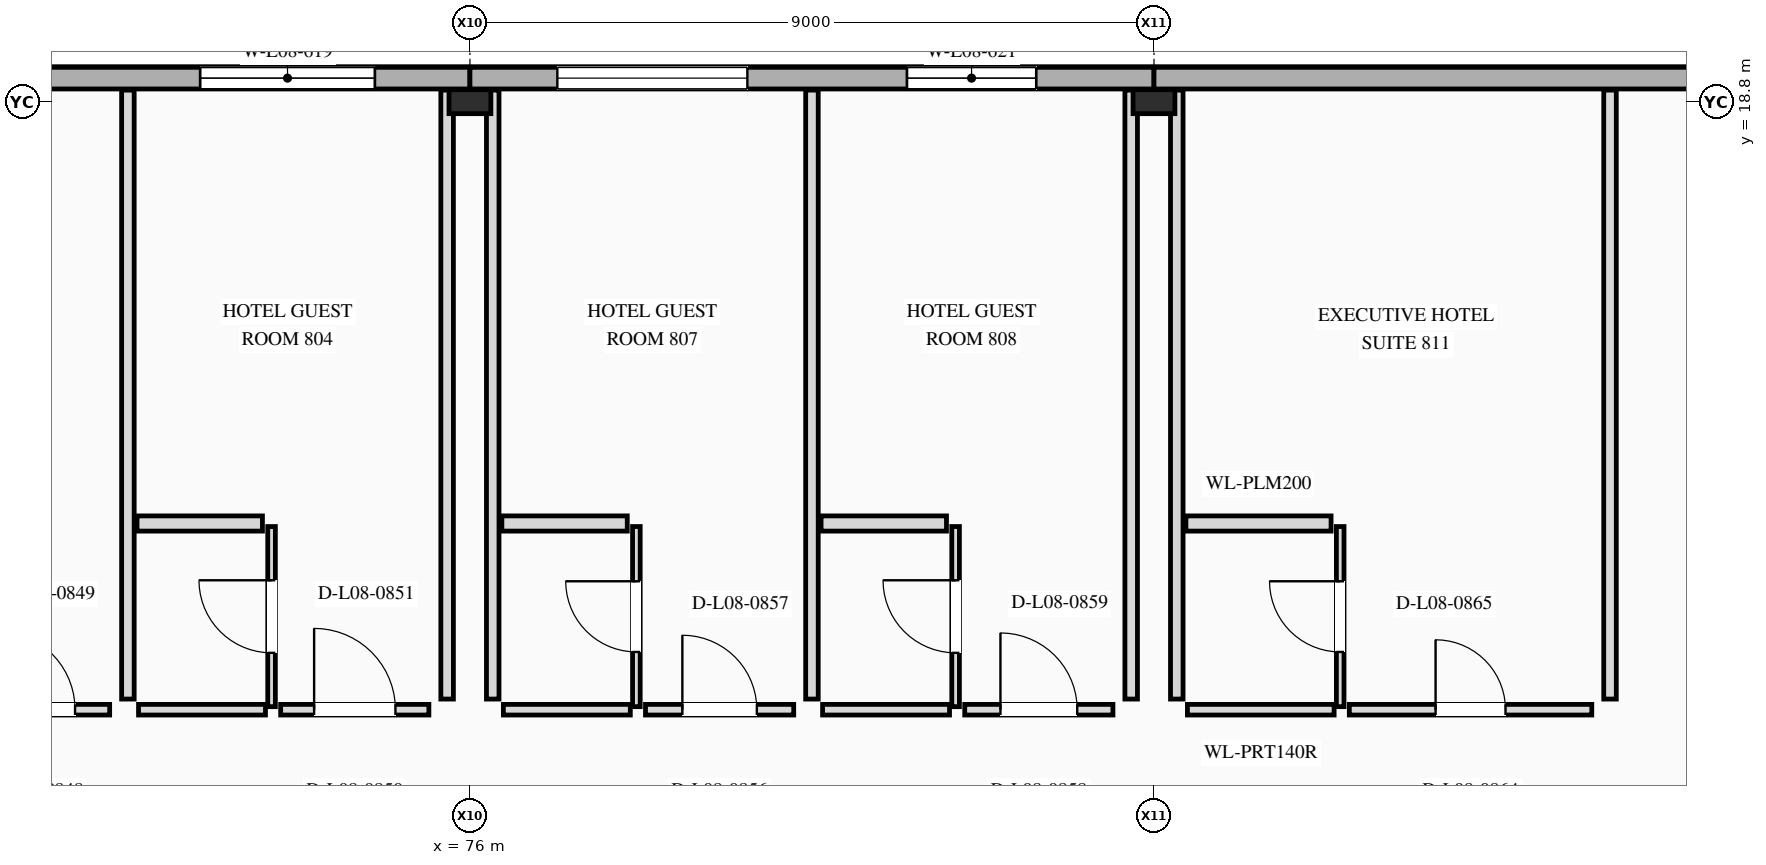
"""IFC4 building model, lengths in metres.
Left out: names, types, materials, properties, quantities, classifications, styles, units other than length and angle.
Written with IfcOpenShell. Run it as: python <this file> out.ifc"""

import sys

from ifc_helpers import new_model, si_unit, direction, frame, frame_2d, origin, origin_2d, place, context, subcontext, project, spatial, rectangle, i_section, extrude, element, fill, save


model = new_model("IFC4")
c1 = context("Model", 3, precision=1e-05, world=origin(), true_north=direction((0.0, 1.0)))
c2 = subcontext(c1, "Body", "Model", "MODEL_VIEW")
j1 = project(units=[si_unit("LENGTHUNIT", "METRE"), si_unit("PLANEANGLEUNIT", "RADIAN")], contexts=[c1])
p1 = place(None, origin())
s1 = spatial("IfcSite", under=j1, at=p1, CompositionType="ELEMENT")
p2 = place(p1, origin())
s2 = spatial("IfcBuilding", under=s1, at=p2, CompositionType="ELEMENT")
p3 = place(p2, frame((0.0, 0.0, 34.1)))
s3 = spatial("IfcBuildingStorey", under=s2, at=p3, CompositionType="ELEMENT", Elevation=34.1)
for number, where, z_axis, x_axis in (
    (1, (76.0, 18.8, 0.0), (0.0, 0.0, 1.0), (0.0, 1.0, 0.0)),
    (2, (85.0, 18.8, 0.0), (0.0, 0.0, 1.0), (0.0, 1.0, 0.0)),
):
    element("IfcColumn", number, at=place(p3, frame(where, z_axis=z_axis, x_axis=x_axis)), inside=s3, PredefinedType="COLUMN", context=c2, shape_type="SweptSolid", body=[
        extrude(i_section(OverallWidth=0.315, OverallDepth=0.551, WebThickness=0.015, FlangeThickness=0.024, at=origin_2d()), origin(), (0.0, 0.0, 1.0), 3.5),
    ])
p4 = place(p3, frame((76.0, 19.11, 0.0), z_axis=(0.0, 0.0, 1.0), x_axis=(-1.0, 0.0, 0.0)))
e3 = element("IfcWall", 3, at=p4, inside=s3, PredefinedType="STANDARD", context=c2, shape_type="SweptSolid", body=[
    extrude(rectangle(XDim=9.31, YDim=0.285, at=frame_2d((4.655, 0.0))), origin(), (0.0, 0.0, 1.0), 3.5),
])
p5 = place(p4, frame((5.6, 0.0, 0.85)))
e4 = element("IfcOpeningElement", 4, at=p5, cuts=e3, PredefinedType="OPENING", context=c2, shape_type="SweptSolid", body=[
    extrude(rectangle(XDim=2.0, YDim=1.65, at=frame_2d((1.0, 0.825))), frame((0.0, 0.152, 0.0), z_axis=(0.0, -1.0, 0.0), x_axis=(1.0, 0.0, 0.0)), (0.0, 0.0, 1.0), 0.305),
])
p6 = place(p4, frame((1.25, 0.0, 0.85)))
e5 = element("IfcOpeningElement", 5, at=p6, cuts=e3, PredefinedType="OPENING", context=c2, shape_type="SweptSolid", body=[
    extrude(rectangle(XDim=2.3, YDim=1.7, at=frame_2d((1.15, 0.85))), frame((0.0, 0.152, 0.0), z_axis=(0.0, -1.0, 0.0), x_axis=(1.0, 0.0, 0.0)), (0.0, 0.0, 1.0), 0.305),
])
p7 = place(p3, frame((85.0, 19.11, 0.0), z_axis=(0.0, 0.0, 1.0), x_axis=(-1.0, 0.0, 0.0)))
e6 = element("IfcWall", 6, at=p7, inside=s3, PredefinedType="STANDARD", context=c2, shape_type="SweptSolid", body=[
    extrude(rectangle(XDim=9.0, YDim=0.285, at=frame_2d((4.5, 0.0))), origin(), (0.0, 0.0, 1.0), 3.5),
])
p8 = place(p7, frame((5.35, 0.0, 0.85)))
e7 = element("IfcOpeningElement", 7, at=p8, cuts=e6, PredefinedType="OPENING", context=c2, shape_type="SweptSolid", body=[
    extrude(rectangle(XDim=2.5, YDim=1.75, at=frame_2d((1.25, 0.875))), frame((0.0, 0.152, 0.0), z_axis=(0.0, -1.0, 0.0), x_axis=(1.0, 0.0, 0.0)), (0.0, 0.0, 1.0), 0.305),
])
p9 = place(p7, frame((1.55, 0.0, 0.85)))
e8 = element("IfcOpeningElement", 8, at=p9, cuts=e6, PredefinedType="OPENING", context=c2, shape_type="SweptSolid", body=[
    extrude(rectangle(XDim=1.7, YDim=1.6, at=frame_2d((0.85, 0.8))), frame((0.0, 0.152, 0.0), z_axis=(0.0, -1.0, 0.0), x_axis=(1.0, 0.0, 0.0)), (0.0, 0.0, 1.0), 0.305),
])
p10 = place(p3, frame((94.0, 19.11, 0.0), z_axis=(0.0, 0.0, 1.0), x_axis=(-1.0, 0.0, 0.0)))
e9 = element("IfcWall", 9, at=p10, inside=s3, PredefinedType="STANDARD", context=c2, shape_type="SweptSolid", body=[
    extrude(rectangle(XDim=9.0, YDim=0.285, at=frame_2d((4.5, 0.0))), origin(), (0.0, 0.0, 1.0), 3.5),
])
p11 = place(p3, frame((69.31, 10.8, 0.0), z_axis=(0.0, 0.0, 1.0), x_axis=(1.0, 0.0, 0.0)))
e10 = element("IfcWall", 10, at=p11, inside=s3, PredefinedType="PARTITIONING", context=c2, shape_type="SweptSolid", body=[
    extrude(rectangle(XDim=1.95, YDim=0.14, at=frame_2d((0.975, 0.0))), origin(), (0.0, 0.0, 1.0), 3.19),
])
p12 = place(p11, frame((0.455, 0.0, 0.0)))
e11 = element("IfcOpeningElement", 11, at=p12, cuts=e10, PredefinedType="OPENING", context=c2, shape_type="SweptSolid", body=[
    extrude(rectangle(XDim=1.04, YDim=2.4, at=frame_2d((0.52, 1.2))), frame((0.0, 0.08, 0.0), z_axis=(0.0, -1.0, 0.0), x_axis=(1.0, 0.0, 0.0)), (0.0, 0.0, 1.0), 0.16),
])
p13 = place(p3, frame((71.5, 10.94, 0.0), z_axis=(0.0, 0.0, 1.0), x_axis=(0.0, 1.0, 0.0)))
e12 = element("IfcWall", 12, at=p13, inside=s3, PredefinedType="PARTITIONING", context=c2, shape_type="SweptSolid", body=[
    extrude(rectangle(XDim=8.012, YDim=0.165, at=frame_2d((4.006, 0.0))), origin(), (0.0, 0.0, 1.0), 2.603),
])
p14 = place(p3, frame((71.64, 10.8, 0.0), z_axis=(0.0, 0.0, 1.0), x_axis=(1.0, 0.0, 0.0)))
e13 = element("IfcWall", 13, at=p14, inside=s3, PredefinedType="PARTITIONING", context=c2, shape_type="SweptSolid", body=[
    extrude(rectangle(XDim=1.67, YDim=0.14, at=frame_2d((0.835, 0.0))), origin(), (0.0, 0.0, 1.0), 3.19),
])
p15 = place(p3, frame((73.51, 10.8, 0.0), z_axis=(0.0, 0.0, 1.0), x_axis=(1.0, 0.0, 0.0)))
e14 = element("IfcWall", 14, at=p15, inside=s3, PredefinedType="PARTITIONING", context=c2, shape_type="SweptSolid", body=[
    extrude(rectangle(XDim=1.95, YDim=0.14, at=frame_2d((0.975, 0.0))), origin(), (0.0, 0.0, 1.0), 3.19),
])
p16 = place(p15, frame((0.44, 0.0, 0.0)))
e15 = element("IfcOpeningElement", 15, at=p16, cuts=e14, PredefinedType="OPENING", context=c2, shape_type="SweptSolid", body=[
    extrude(rectangle(XDim=1.07, YDim=2.4, at=frame_2d((0.535, 1.2))), frame((0.0, 0.08, 0.0), z_axis=(0.0, -1.0, 0.0), x_axis=(1.0, 0.0, 0.0)), (0.0, 0.0, 1.0), 0.16),
])
p17 = place(p3, frame((75.7, 10.94, 0.0), z_axis=(0.0, 0.0, 1.0), x_axis=(0.0, 1.0, 0.0)))
e16 = element("IfcWall", 16, at=p17, inside=s3, PredefinedType="PARTITIONING", context=c2, shape_type="SweptSolid", body=[
    extrude(rectangle(XDim=8.012, YDim=0.165, at=frame_2d((4.006, 0.0))), origin(), (0.0, 0.0, 1.0), 2.519),
])
p18 = place(p3, frame((73.39, 10.84, 0.0), z_axis=(0.0, 0.0, 1.0), x_axis=(0.0, 1.0, 0.0)))
e17 = element("IfcWall", 17, at=p18, inside=s3, PredefinedType="PARTITIONING", context=c2, shape_type="SweptSolid", body=[
    extrude(rectangle(XDim=2.37, YDim=0.1, at=frame_2d((1.185, 0.0))), origin(), (0.0, 0.0, 1.0), 2.798),
])
p19 = place(p18, frame((0.708, 0.0, 0.0)))
e18 = element("IfcOpeningElement", 18, at=p19, cuts=e17, PredefinedType="OPENING", context=c2, shape_type="SweptSolid", body=[
    extrude(rectangle(XDim=0.955, YDim=2.14, at=frame_2d((0.478, 1.07))), frame((0.0, 0.06, 0.0), z_axis=(0.0, -1.0, 0.0), x_axis=(1.0, 0.0, 0.0)), (0.0, 0.0, 1.0), 0.12),
])
p20 = place(p3, frame((71.62, 13.25, 0.0), z_axis=(0.0, 0.0, 1.0), x_axis=(1.0, 0.0, 0.0)))
e19 = element("IfcWall", 19, at=p20, inside=s3, PredefinedType="PLUMBINGWALL", context=c2, shape_type="SweptSolid", body=[
    extrude(rectangle(XDim=1.65, YDim=0.2, at=frame_2d((0.825, 0.0))), origin(), (0.0, 0.0, 1.0), 3.19),
])
p21 = place(p3, frame((76.44, 10.8, 0.0), z_axis=(0.0, 0.0, 1.0), x_axis=(1.0, 0.0, 0.0)))
e20 = element("IfcWall", 20, at=p21, inside=s3, PredefinedType="PARTITIONING", context=c2, shape_type="SweptSolid", body=[
    extrude(rectangle(XDim=1.67, YDim=0.14, at=frame_2d((0.835, 0.0))), origin(), (0.0, 0.0, 1.0), 3.19),
])
p22 = place(p3, frame((78.31, 10.8, 0.0), z_axis=(0.0, 0.0, 1.0), x_axis=(1.0, 0.0, 0.0)))
e21 = element("IfcWall", 21, at=p22, inside=s3, PredefinedType="PARTITIONING", context=c2, shape_type="SweptSolid", body=[
    extrude(rectangle(XDim=1.95, YDim=0.14, at=frame_2d((0.975, 0.0))), origin(), (0.0, 0.0, 1.0), 3.19),
])
p23 = place(p22, frame((0.485, 0.0, 0.0)))
e22 = element("IfcOpeningElement", 22, at=p23, cuts=e21, PredefinedType="OPENING", context=c2, shape_type="SweptSolid", body=[
    extrude(rectangle(XDim=0.98, YDim=2.2, at=frame_2d((0.49, 1.1))), frame((0.0, 0.08, 0.0), z_axis=(0.0, -1.0, 0.0), x_axis=(1.0, 0.0, 0.0)), (0.0, 0.0, 1.0), 0.16),
])
p24 = place(p3, frame((76.3, 10.94, 0.0), z_axis=(0.0, 0.0, 1.0), x_axis=(0.0, 1.0, 0.0)))
e23 = element("IfcWall", 23, at=p24, inside=s3, PredefinedType="PARTITIONING", context=c2, shape_type="SweptSolid", body=[
    extrude(rectangle(XDim=8.012, YDim=0.165, at=frame_2d((4.006, 0.0))), origin(), (0.0, 0.0, 1.0), 2.519),
])
p25 = place(p3, frame((80.5, 10.94, 0.0), z_axis=(0.0, 0.0, 1.0), x_axis=(0.0, 1.0, 0.0)))
e24 = element("IfcWall", 24, at=p25, inside=s3, PredefinedType="PARTITIONING", context=c2, shape_type="SweptSolid", body=[
    extrude(rectangle(XDim=8.012, YDim=0.165, at=frame_2d((4.006, 0.0))), origin(), (0.0, 0.0, 1.0), 2.603),
])
p26 = place(p3, frame((78.19, 10.84, 0.0), z_axis=(0.0, 0.0, 1.0), x_axis=(0.0, 1.0, 0.0)))
e25 = element("IfcWall", 25, at=p26, inside=s3, PredefinedType="PARTITIONING", context=c2, shape_type="SweptSolid", body=[
    extrude(rectangle(XDim=2.37, YDim=0.1, at=frame_2d((1.185, 0.0))), origin(), (0.0, 0.0, 1.0), 2.798),
])
p27 = place(p26, frame((0.72, 0.0, 0.0)))
e26 = element("IfcOpeningElement", 26, at=p27, cuts=e25, PredefinedType="OPENING", context=c2, shape_type="SweptSolid", body=[
    extrude(rectangle(XDim=0.93, YDim=2.22, at=frame_2d((0.465, 1.11))), frame((0.0, 0.06, 0.0), z_axis=(0.0, -1.0, 0.0), x_axis=(1.0, 0.0, 0.0)), (0.0, 0.0, 1.0), 0.12),
])
p28 = place(p3, frame((76.42, 13.25, 0.0), z_axis=(0.0, 0.0, 1.0), x_axis=(1.0, 0.0, 0.0)))
e27 = element("IfcWall", 27, at=p28, inside=s3, PredefinedType="PLUMBINGWALL", context=c2, shape_type="SweptSolid", body=[
    extrude(rectangle(XDim=1.65, YDim=0.2, at=frame_2d((0.825, 0.0))), origin(), (0.0, 0.0, 1.0), 3.19),
])
p29 = place(p3, frame((80.64, 10.8, 0.0), z_axis=(0.0, 0.0, 1.0), x_axis=(1.0, 0.0, 0.0)))
e28 = element("IfcWall", 28, at=p29, inside=s3, PredefinedType="PARTITIONING", context=c2, shape_type="SweptSolid", body=[
    extrude(rectangle(XDim=1.67, YDim=0.14, at=frame_2d((0.835, 0.0))), origin(), (0.0, 0.0, 1.0), 3.19),
])
p30 = place(p3, frame((82.51, 10.8, 0.0), z_axis=(0.0, 0.0, 1.0), x_axis=(1.0, 0.0, 0.0)))
e29 = element("IfcWall", 29, at=p30, inside=s3, PredefinedType="PARTITIONING", context=c2, shape_type="SweptSolid", body=[
    extrude(rectangle(XDim=1.95, YDim=0.14, at=frame_2d((0.975, 0.0))), origin(), (0.0, 0.0, 1.0), 3.19),
])
p31 = place(p30, frame((0.47, 0.0, 0.0)))
e30 = element("IfcOpeningElement", 30, at=p31, cuts=e29, PredefinedType="OPENING", context=c2, shape_type="SweptSolid", body=[
    extrude(rectangle(XDim=1.01, YDim=2.2, at=frame_2d((0.505, 1.1))), frame((0.0, 0.08, 0.0), z_axis=(0.0, -1.0, 0.0), x_axis=(1.0, 0.0, 0.0)), (0.0, 0.0, 1.0), 0.16),
])
p32 = place(p3, frame((84.7, 10.94, 0.0), z_axis=(0.0, 0.0, 1.0), x_axis=(0.0, 1.0, 0.0)))
e31 = element("IfcWall", 31, at=p32, inside=s3, PredefinedType="PARTITIONING", context=c2, shape_type="SweptSolid", body=[
    extrude(rectangle(XDim=8.012, YDim=0.165, at=frame_2d((4.006, 0.0))), origin(), (0.0, 0.0, 1.0), 2.519),
])
p33 = place(p3, frame((82.39, 10.84, 0.0), z_axis=(0.0, 0.0, 1.0), x_axis=(0.0, 1.0, 0.0)))
e32 = element("IfcWall", 32, at=p33, inside=s3, PredefinedType="PARTITIONING", context=c2, shape_type="SweptSolid", body=[
    extrude(rectangle(XDim=2.37, YDim=0.1, at=frame_2d((1.185, 0.0))), origin(), (0.0, 0.0, 1.0), 2.798),
])
p34 = place(p33, frame((0.708, 0.0, 0.0)))
e33 = element("IfcOpeningElement", 33, at=p34, cuts=e32, PredefinedType="OPENING", context=c2, shape_type="SweptSolid", body=[
    extrude(rectangle(XDim=0.955, YDim=2.22, at=frame_2d((0.478, 1.11))), frame((0.0, 0.06, 0.0), z_axis=(0.0, -1.0, 0.0), x_axis=(1.0, 0.0, 0.0)), (0.0, 0.0, 1.0), 0.12),
])
p35 = place(p3, frame((80.62, 13.25, 0.0), z_axis=(0.0, 0.0, 1.0), x_axis=(1.0, 0.0, 0.0)))
e34 = element("IfcWall", 34, at=p35, inside=s3, PredefinedType="PLUMBINGWALL", context=c2, shape_type="SweptSolid", body=[
    extrude(rectangle(XDim=1.65, YDim=0.2, at=frame_2d((0.825, 0.0))), origin(), (0.0, 0.0, 1.0), 3.19),
])
p36 = place(p3, frame((85.44, 10.8, 0.0), z_axis=(0.0, 0.0, 1.0), x_axis=(1.0, 0.0, 0.0)))
e35 = element("IfcWall", 35, at=p36, inside=s3, PredefinedType="PARTITIONING", context=c2, shape_type="SweptSolid", body=[
    extrude(rectangle(XDim=1.93, YDim=0.14, at=frame_2d((0.965, 0.0))), origin(), (0.0, 0.0, 1.0), 3.19),
])
p37 = place(p3, frame((87.57, 10.8, 0.0), z_axis=(0.0, 0.0, 1.0), x_axis=(1.0, 0.0, 0.0)))
e36 = element("IfcWall", 36, at=p37, inside=s3, PredefinedType="PARTITIONING", context=c2, shape_type="SweptSolid", body=[
    extrude(rectangle(XDim=3.19, YDim=0.14, at=frame_2d((1.595, 0.0))), origin(), (0.0, 0.0, 1.0), 3.19),
])
p38 = place(p37, frame((1.135, 0.0, 0.0)))
e37 = element("IfcOpeningElement", 37, at=p38, cuts=e36, PredefinedType="OPENING", context=c2, shape_type="SweptSolid", body=[
    extrude(rectangle(XDim=0.92, YDim=2.3, at=frame_2d((0.46, 1.15))), frame((0.0, 0.08, 0.0), z_axis=(0.0, -1.0, 0.0), x_axis=(1.0, 0.0, 0.0)), (0.0, 0.0, 1.0), 0.16),
])
p39 = place(p3, frame((85.3, 10.94, 0.0), z_axis=(0.0, 0.0, 1.0), x_axis=(0.0, 1.0, 0.0)))
e38 = element("IfcWall", 38, at=p39, inside=s3, PredefinedType="PARTITIONING", context=c2, shape_type="SweptSolid", body=[
    extrude(rectangle(XDim=8.012, YDim=0.165, at=frame_2d((4.006, 0.0))), origin(), (0.0, 0.0, 1.0), 2.519),
])
p40 = place(p3, frame((91.0, 10.94, 0.0), z_axis=(0.0, 0.0, 1.0), x_axis=(0.0, 1.0, 0.0)))
e39 = element("IfcWall", 39, at=p40, inside=s3, PredefinedType="PARTITIONING", context=c2, shape_type="SweptSolid", body=[
    extrude(rectangle(XDim=8.012, YDim=0.165, at=frame_2d((4.006, 0.0))), origin(), (0.0, 0.0, 1.0), 3.19),
])
p41 = place(p3, frame((87.45, 10.84, 0.0), z_axis=(0.0, 0.0, 1.0), x_axis=(0.0, 1.0, 0.0)))
e40 = element("IfcWall", 40, at=p41, inside=s3, PredefinedType="PARTITIONING", context=c2, shape_type="SweptSolid", body=[
    extrude(rectangle(XDim=2.37, YDim=0.1, at=frame_2d((1.185, 0.0))), origin(), (0.0, 0.0, 1.0), 3.19),
])
p42 = place(p41, frame((0.72, 0.0, 0.0)))
e41 = element("IfcOpeningElement", 41, at=p42, cuts=e40, PredefinedType="OPENING", context=c2, shape_type="SweptSolid", body=[
    extrude(rectangle(XDim=0.93, YDim=2.14, at=frame_2d((0.465, 1.07))), frame((0.0, 0.06, 0.0), z_axis=(0.0, -1.0, 0.0), x_axis=(1.0, 0.0, 0.0)), (0.0, 0.0, 1.0), 0.12),
])
p43 = place(p3, frame((85.42, 13.25, 0.0), z_axis=(0.0, 0.0, 1.0), x_axis=(1.0, 0.0, 0.0)))
e42 = element("IfcWall", 42, at=p43, inside=s3, PredefinedType="PLUMBINGWALL", context=c2, shape_type="SweptSolid", body=[
    extrude(rectangle(XDim=1.91, YDim=0.2, at=frame_2d((0.955, 0.0))), origin(), (0.0, 0.0, 1.0), 3.19),
])
p44 = place(p6, origin())
e43 = element("IfcWindow", 43, at=p44, inside=s3, PartitioningType="SINGLE_PANEL", PredefinedType="WINDOW", context=c2, shape_type="SweptSolid", body=[
    extrude(rectangle(XDim=2.3, YDim=1.7, at=frame_2d((1.15, 0.85))), frame((0.0, 0.03, 0.0), z_axis=(0.0, -1.0, 0.0), x_axis=(1.0, 0.0, 0.0)), (0.0, 0.0, 1.0), 0.06),
])
fill(e5, e43)
p45 = place(p8, origin())
e44 = element("IfcWindow", 44, at=p45, inside=s3, PartitioningType="SINGLE_PANEL", PredefinedType="WINDOW", context=c2, shape_type="SweptSolid", body=[
    extrude(rectangle(XDim=2.5, YDim=1.75, at=frame_2d((1.25, 0.875))), frame((0.0, 0.03, 0.0), z_axis=(0.0, -1.0, 0.0), x_axis=(1.0, 0.0, 0.0)), (0.0, 0.0, 1.0), 0.06),
])
fill(e7, e44)
p46 = place(p9, origin())
e45 = element("IfcWindow", 45, at=p46, inside=s3, PartitioningType="SINGLE_PANEL", PredefinedType="WINDOW", context=c2, shape_type="SweptSolid", body=[
    extrude(rectangle(XDim=1.7, YDim=1.6, at=frame_2d((0.85, 0.8))), frame((0.0, 0.03, 0.0), z_axis=(0.0, -1.0, 0.0), x_axis=(1.0, 0.0, 0.0)), (0.0, 0.0, 1.0), 0.06),
])
fill(e8, e45)
p47 = place(p12, origin())
e46 = element("IfcDoor", 46, at=p47, inside=s3, OperationType="SINGLE_SWING_LEFT", PredefinedType="DOOR", context=c2, shape_type="SweptSolid", body=[
    extrude(rectangle(XDim=1.04, YDim=2.4, at=frame_2d((0.52, 1.2))), frame((0.0, 0.025, 0.0), z_axis=(0.0, -1.0, 0.0), x_axis=(1.0, 0.0, 0.0)), (0.0, 0.0, 1.0), 0.05),
])
fill(e11, e46)
p48 = place(p16, origin())
e47 = element("IfcDoor", 47, at=p48, inside=s3, OperationType="SINGLE_SWING_LEFT", PredefinedType="DOOR", context=c2, shape_type="SweptSolid", body=[
    extrude(rectangle(XDim=1.07, YDim=2.4, at=frame_2d((0.535, 1.2))), frame((0.0, 0.025, 0.0), z_axis=(0.0, -1.0, 0.0), x_axis=(1.0, 0.0, 0.0)), (0.0, 0.0, 1.0), 0.05),
])
fill(e15, e47)
p49 = place(p19, origin())
e48 = element("IfcDoor", 48, at=p49, inside=s3, OperationType="SINGLE_SWING_RIGHT", PredefinedType="DOOR", context=c2, shape_type="SweptSolid", body=[
    extrude(rectangle(XDim=0.955, YDim=2.14, at=frame_2d((0.478, 1.07))), frame((0.0, 0.025, 0.0), z_axis=(0.0, -1.0, 0.0), x_axis=(1.0, 0.0, 0.0)), (0.0, 0.0, 1.0), 0.05),
])
fill(e18, e48)
p50 = place(p23, origin())
e49 = element("IfcDoor", 49, at=p50, inside=s3, OperationType="SINGLE_SWING_LEFT", PredefinedType="DOOR", context=c2, shape_type="SweptSolid", body=[
    extrude(rectangle(XDim=0.98, YDim=2.2, at=frame_2d((0.49, 1.1))), frame((0.0, 0.025, 0.0), z_axis=(0.0, -1.0, 0.0), x_axis=(1.0, 0.0, 0.0)), (0.0, 0.0, 1.0), 0.05),
])
fill(e22, e49)
p51 = place(p27, origin())
e50 = element("IfcDoor", 50, at=p51, inside=s3, OperationType="SINGLE_SWING_RIGHT", PredefinedType="DOOR", context=c2, shape_type="SweptSolid", body=[
    extrude(rectangle(XDim=0.93, YDim=2.22, at=frame_2d((0.465, 1.11))), frame((0.0, 0.025, 0.0), z_axis=(0.0, -1.0, 0.0), x_axis=(1.0, 0.0, 0.0)), (0.0, 0.0, 1.0), 0.05),
])
fill(e26, e50)
p52 = place(p31, origin())
e51 = element("IfcDoor", 51, at=p52, inside=s3, OperationType="SINGLE_SWING_LEFT", PredefinedType="DOOR", context=c2, shape_type="SweptSolid", body=[
    extrude(rectangle(XDim=1.01, YDim=2.2, at=frame_2d((0.505, 1.1))), frame((0.0, 0.025, 0.0), z_axis=(0.0, -1.0, 0.0), x_axis=(1.0, 0.0, 0.0)), (0.0, 0.0, 1.0), 0.05),
])
fill(e30, e51)
p53 = place(p34, origin())
e52 = element("IfcDoor", 52, at=p53, inside=s3, OperationType="SINGLE_SWING_RIGHT", PredefinedType="DOOR", context=c2, shape_type="SweptSolid", body=[
    extrude(rectangle(XDim=0.955, YDim=2.22, at=frame_2d((0.478, 1.11))), frame((0.0, 0.025, 0.0), z_axis=(0.0, -1.0, 0.0), x_axis=(1.0, 0.0, 0.0)), (0.0, 0.0, 1.0), 0.05),
])
fill(e33, e52)
p54 = place(p38, origin())
e53 = element("IfcDoor", 53, at=p54, inside=s3, OperationType="SINGLE_SWING_LEFT", PredefinedType="DOOR", context=c2, shape_type="SweptSolid", body=[
    extrude(rectangle(XDim=0.92, YDim=2.3, at=frame_2d((0.46, 1.15))), frame((0.0, 0.025, 0.0), z_axis=(0.0, -1.0, 0.0), x_axis=(1.0, 0.0, 0.0)), (0.0, 0.0, 1.0), 0.05),
])
fill(e37, e53)
p55 = place(p42, origin())
e54 = element("IfcDoor", 54, at=p55, inside=s3, OperationType="SINGLE_SWING_RIGHT", PredefinedType="DOOR", context=c2, shape_type="SweptSolid", body=[
    extrude(rectangle(XDim=0.93, YDim=2.14, at=frame_2d((0.465, 1.07))), frame((0.0, 0.025, 0.0), z_axis=(0.0, -1.0, 0.0), x_axis=(1.0, 0.0, 0.0)), (0.0, 0.0, 1.0), 0.05),
])
fill(e41, e54)
save(model, sys.argv[1])
